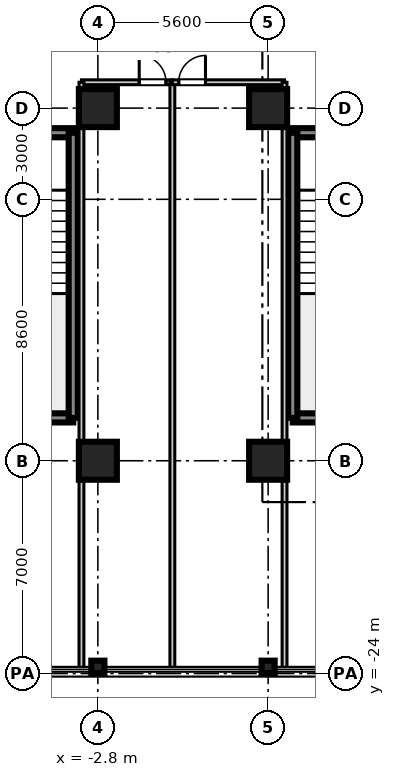
"""IFC4 building model, lengths in metres.
Left out: names, types, materials, properties, quantities, classifications, styles, units other than length and angle.
Written with IfcOpenShell. Run it as: python <this file> out.ifc"""

import sys

from ifc_helpers import new_model, si_unit, direction, frame, frame_2d, origin, origin_2d, place, context, subcontext, project, spatial, rectangle, i_section, extrude, source, transform, mapped, element, fill, save


model = new_model("IFC4")
c1 = context("Model", 3, precision=1e-05, world=origin(), true_north=direction((0.0, 1.0)))
c2 = subcontext(c1, "Body", "Model", "MODEL_VIEW")
j1 = project(units=[si_unit("LENGTHUNIT", "METRE"), si_unit("PLANEANGLEUNIT", "RADIAN")], contexts=[c1])
p1 = place(None, origin())
s1 = spatial("IfcSite", under=j1, at=p1, CompositionType="ELEMENT")
p2 = place(p1, origin())
s2 = spatial("IfcBuilding", under=s1, at=p2, CompositionType="ELEMENT")
p3 = place(p2, frame((0.0, 0.0, 110.2)))
s3 = spatial("IfcBuildingStorey", under=s2, at=p3, CompositionType="ELEMENT", Elevation=110.2)
m1 = source(origin(), c2, "Body", "SweptSolid", [
    extrude(rectangle(XDim=1.25, YDim=1.25, at=origin_2d()), origin(), (0.0, 0.0, 1.0), 3.605),
])
for number, where, z_axis, x_axis in (
    (1, (-2.8, -17.0, 0.0), (0.0, 0.0, 1.0), (1.0, 0.0, 0.0)),
    (2, (-2.8, -5.4, 0.0), (0.0, 0.0, 1.0), (1.0, 0.0, 0.0)),
    (3, (2.8, -17.0, 0.0), (0.0, 0.0, 1.0), (1.0, 0.0, 0.0)),
    (4, (2.8, -5.4, 0.0), (0.0, 0.0, 1.0), (1.0, 0.0, 0.0)),
):
    element("IfcColumn", number, at=place(p3, frame(where, z_axis=z_axis, x_axis=x_axis)), inside=s3, PredefinedType="COLUMN", context=c2, shape_type="MappedRepresentation", body=[
        mapped(m1, transform((0.0, 0.0, 0.0), scale=1.0)),
    ])
m2 = source(origin(), c2, "Body", "SweptSolid", [
    extrude(i_section(OverallWidth=0.409, OverallDepth=0.43, WebThickness=0.021, FlangeThickness=0.034, at=origin_2d()), origin(), (0.0, 0.0, 1.0), 3.605),
])
for number, where, z_axis, x_axis in (
    (5, (-2.8, -23.78, 0.0), (0.0, 0.0, 1.0), (0.0, 1.0, 0.0)),
    (6, (2.8, -23.78, 0.0), (0.0, 0.0, 1.0), (0.0, 1.0, 0.0)),
):
    element("IfcColumn", number, at=place(p3, frame(where, z_axis=z_axis, x_axis=x_axis)), inside=s3, PredefinedType="COLUMN", context=c2, shape_type="MappedRepresentation", body=[
        mapped(m2, transform((0.0, 0.0, 0.0), scale=1.0)),
    ])
m3 = source(origin(), c2, "Body", "SweptSolid", [
    extrude(rectangle(XDim=3.98, YDim=0.3, at=frame_2d((1.99, 0.0))), origin(), (0.0, 0.0, 1.0), 3.38),
])
for number, where, z_axis, x_axis in (
    (7, (3.61, -15.59, 0.0), (0.0, 0.0, 1.0), (1.0, 0.0, 0.0)),
    (8, (3.61, -6.21, 0.0), (0.0, 0.0, 1.0), (1.0, 0.0, 0.0)),
):
    element("IfcWall", number, at=place(p3, frame(where, z_axis=z_axis, x_axis=x_axis)), inside=s3, PredefinedType="SHEAR", context=c2, shape_type="MappedRepresentation", body=[
        mapped(m3, transform((0.0, 0.0, 0.0), scale=1.0)),
    ])
m4 = source(origin(), c2, "Body", "SweptSolid", [
    extrude(rectangle(XDim=9.38, YDim=0.3, at=frame_2d((4.69, 0.0))), origin(), (0.0, 0.0, 1.0), 3.38),
])
p4 = place(p3, frame((3.61, -15.59, 0.0), z_axis=(0.0, 0.0, 1.0), x_axis=(0.0, 1.0, 0.0)))
e9 = element("IfcWall", 9, at=p4, inside=s3, PredefinedType="SHEAR", context=c2, shape_type="MappedRepresentation", body=[
    mapped(m4, transform((0.0, 0.0, 0.0), scale=1.0)),
])
p5 = place(p3, frame((-7.59, -15.59, 0.0), z_axis=(0.0, 0.0, 1.0), x_axis=(1.0, 0.0, 0.0)))
e10 = element("IfcWall", 10, at=p5, inside=s3, PredefinedType="SHEAR", context=c2, shape_type="MappedRepresentation", body=[
    mapped(m3, transform((0.0, 0.0, 0.0), scale=1.0)),
])
p6 = place(p3, frame((-7.59, -6.21, 0.0), z_axis=(0.0, 0.0, 1.0), x_axis=(1.0, 0.0, 0.0)))
e11 = element("IfcWall", 11, at=p6, inside=s3, PredefinedType="SHEAR", context=c2, shape_type="MappedRepresentation", body=[
    mapped(m3, transform((0.0, 0.0, 0.0), scale=1.0)),
])
p7 = place(p6, frame((1.44, 0.0, 0.0)))
e12 = element("IfcOpeningElement", 12, at=p7, cuts=e11, PredefinedType="OPENING", context=c2, shape_type="SweptSolid", body=[
    extrude(rectangle(XDim=1.1, YDim=2.15, at=frame_2d((0.55, 1.075))), frame((0.0, 0.16, 0.0), z_axis=(0.0, -1.0, 0.0), x_axis=(1.0, 0.0, 0.0)), (0.0, 0.0, 1.0), 0.32),
])
p8 = place(p3, frame((-3.61, -15.59, 0.0), z_axis=(0.0, 0.0, 1.0), x_axis=(0.0, 1.0, 0.0)))
e13 = element("IfcWall", 13, at=p8, inside=s3, PredefinedType="SHEAR", context=c2, shape_type="MappedRepresentation", body=[
    mapped(m4, transform((0.0, 0.0, 0.0), scale=1.0)),
])
m5 = source(origin(), c2, "Body", "SweptSolid", [
    extrude(rectangle(XDim=2.99, YDim=0.16, at=frame_2d((1.495, 0.0))), origin(), (0.0, 0.0, 1.0), 2.72),
])
p9 = place(p3, frame((-3.34, -4.55, 0.0), z_axis=(0.0, 0.0, 1.0), x_axis=(1.0, 0.0, 0.0)))
e14 = element("IfcWall", 14, at=p9, inside=s3, PredefinedType="PARTITIONING", context=c2, shape_type="MappedRepresentation", body=[
    mapped(m5, transform((0.0, 0.0, 0.0), scale=1.0)),
])
p10 = place(p9, frame((1.9, 0.0, 0.0)))
e15 = element("IfcOpeningElement", 15, at=p10, cuts=e14, PredefinedType="OPENING", context=c2, shape_type="SweptSolid", body=[
    extrude(rectangle(XDim=0.88, YDim=2.1, at=frame_2d((0.44, 1.05))), frame((0.0, 0.09, 0.0), z_axis=(0.0, -1.0, 0.0), x_axis=(1.0, 0.0, 0.0)), (0.0, 0.0, 1.0), 0.18),
])
m6 = source(origin(), c2, "Body", "SweptSolid", [
    extrude(rectangle(XDim=19.25, YDim=0.16, at=frame_2d((9.625, 0.0))), origin(), (0.0, 0.0, 1.0), 2.72),
])
for number, where, z_axis, x_axis in (
    (16, (-3.34, -23.8, 0.0), (0.0, 0.0, 1.0), (0.0, 1.0, 0.0)),
    (17, (-0.35, -23.8, 0.0), (0.0, 0.0, 1.0), (0.0, 1.0, 0.0)),
):
    element("IfcWall", number, at=place(p3, frame(where, z_axis=z_axis, x_axis=x_axis)), inside=s3, PredefinedType="PARTITIONING", context=c2, shape_type="MappedRepresentation", body=[
        mapped(m6, transform((0.0, 0.0, 0.0), scale=1.0)),
    ])
m7 = source(origin(), c2, "Body", "SweptSolid", [
    extrude(rectangle(XDim=3.69, YDim=0.16, at=frame_2d((1.845, 0.0))), origin(), (0.0, 0.0, 1.0), 2.72),
])
p11 = place(p3, frame((-0.35, -4.55, 0.0), z_axis=(0.0, 0.0, 1.0), x_axis=(1.0, 0.0, 0.0)))
e18 = element("IfcWall", 18, at=p11, inside=s3, PredefinedType="PARTITIONING", context=c2, shape_type="MappedRepresentation", body=[
    mapped(m7, transform((0.0, 0.0, 0.0), scale=1.0)),
])
p12 = place(p11, frame((0.21, 0.0, 0.0)))
e19 = element("IfcOpeningElement", 19, at=p12, cuts=e18, PredefinedType="OPENING", context=c2, shape_type="SweptSolid", body=[
    extrude(rectangle(XDim=0.88, YDim=2.1, at=frame_2d((0.44, 1.05))), frame((0.0, 0.09, 0.0), z_axis=(0.0, -1.0, 0.0), x_axis=(1.0, 0.0, 0.0)), (0.0, 0.0, 1.0), 0.18),
])
p13 = place(p3, frame((3.34, -23.8, 0.0), z_axis=(0.0, 0.0, 1.0), x_axis=(0.0, 1.0, 0.0)))
e20 = element("IfcWall", 20, at=p13, inside=s3, PredefinedType="PARTITIONING", context=c2, shape_type="MappedRepresentation", body=[
    mapped(m6, transform((0.0, 0.0, 0.0), scale=1.0)),
])
m8 = source(origin(), c2, "Body", "SweptSolid", [
    extrude(rectangle(XDim=0.88, YDim=2.1, at=frame_2d((0.44, 1.05))), frame((0.0, 0.025, 0.0), z_axis=(0.0, -1.0, 0.0), x_axis=(1.0, 0.0, 0.0)), (0.0, 0.0, 1.0), 0.05),
])
p14 = place(p10, frame((0.88, 0.0, 0.0), z_axis=(0.0, 0.0, 1.0), x_axis=(-1.0, 0.0, 0.0)))
e21 = element("IfcDoor", 21, at=p14, inside=s3, OperationType="SINGLE_SWING_LEFT", PredefinedType="DOOR", context=c2, shape_type="MappedRepresentation", body=[
    mapped(m8, transform((0.0, 0.0, 0.0), scale=1.0)),
])
fill(e15, e21)
p15 = place(p12, frame((0.88, 0.0, 0.0), z_axis=(0.0, 0.0, 1.0), x_axis=(-1.0, 0.0, 0.0)))
e22 = element("IfcDoor", 22, at=p15, inside=s3, OperationType="SINGLE_SWING_RIGHT", PredefinedType="DOOR", context=c2, shape_type="MappedRepresentation", body=[
    mapped(m8, transform((0.0, 0.0, 0.0), scale=1.0)),
])
fill(e19, e22)
save(model, sys.argv[1])
